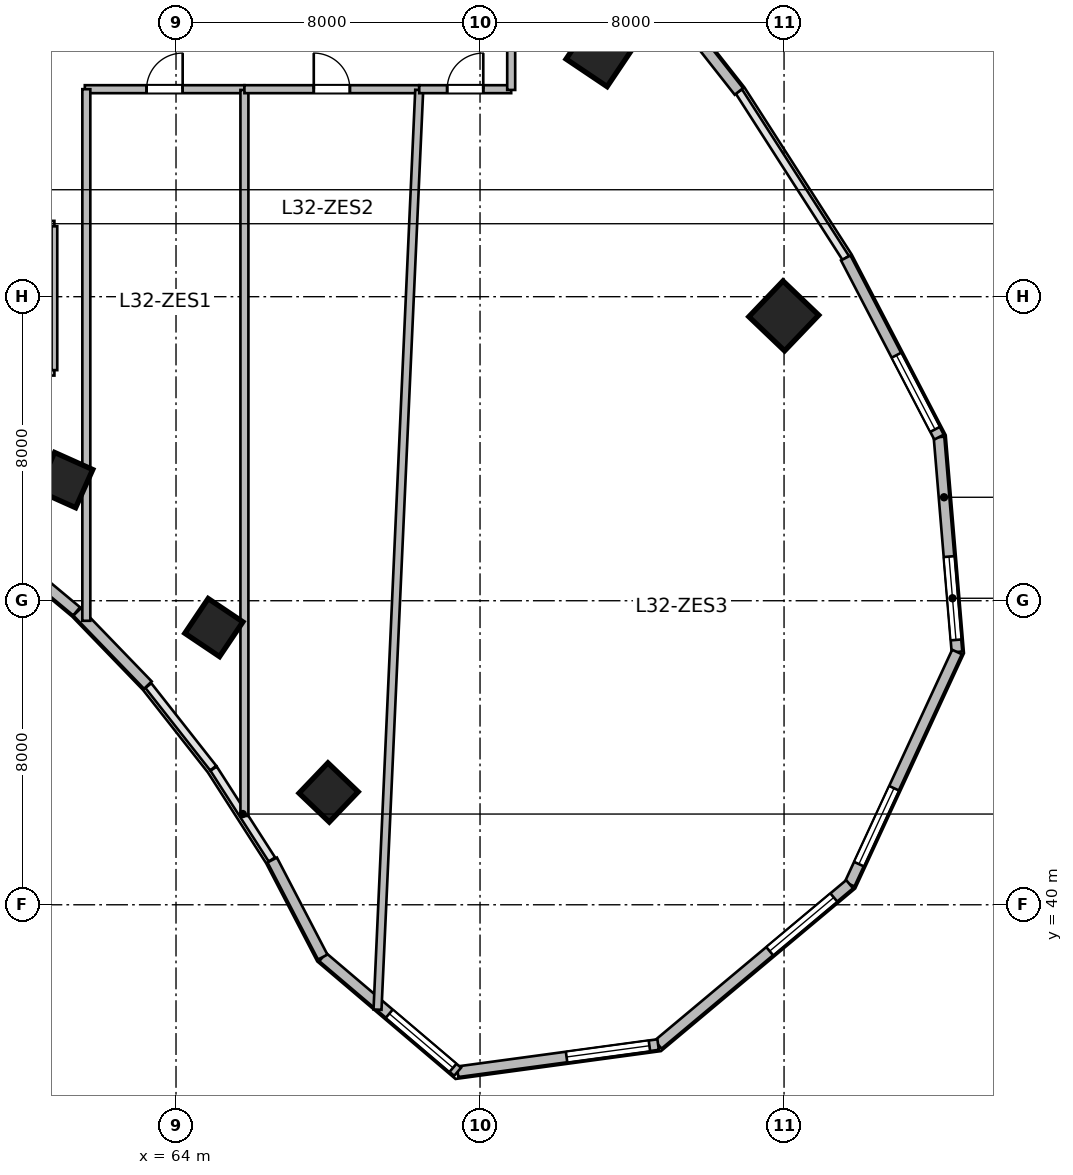
"""IFC4 building model, lengths in metres.
Left out: names, types, materials, properties, quantities, classifications, styles, units other than length and angle.
Written with IfcOpenShell. Run it as: python <this file> out.ifc"""

import sys

from ifc_helpers import new_model, si_unit, direction, frame, frame_2d, origin, origin_2d, place, context, subcontext, project, spatial, rectangle, extrude, source, transform, mapped, element, fill, save


model = new_model("IFC4")
c1 = context("Model", 3, precision=1e-05, world=origin(), true_north=direction((0.0, 1.0)))
c2 = subcontext(c1, "Body", "Model", "MODEL_VIEW")
j1 = project(units=[si_unit("LENGTHUNIT", "METRE"), si_unit("PLANEANGLEUNIT", "RADIAN")], contexts=[c1])
p1 = place(None, origin())
s1 = spatial("IfcSite", under=j1, at=p1, CompositionType="ELEMENT")
p2 = place(p1, origin())
s2 = spatial("IfcBuilding", under=s1, at=p2, CompositionType="ELEMENT")
p3 = place(p2, frame((0.0, 0.0, 135.0)))
s3 = spatial("IfcBuildingStorey", under=s2, at=p3, CompositionType="ELEMENT", Elevation=135.0)
m1 = source(origin(), c2, "Body", "SweptSolid", [
    extrude(rectangle(XDim=1.1, YDim=1.1, at=origin_2d()), origin(), (0.0, 0.0, 1.0), 3.9),
])
for number, where, z_axis, x_axis in (
    (1, (61.082, 51.175, 0.0), (0.0, 0.0, 1.0), (0.409, 0.912, 0.0)),
    (2, (64.996, 47.294, 0.0), (0.0, 0.0, 1.0), (0.558, 0.83, 0.0)),
):
    element("IfcColumn", number, at=place(p3, frame(where, z_axis=z_axis, x_axis=x_axis)), inside=s3, PredefinedType="COLUMN", context=c2, shape_type="MappedRepresentation", body=[
        mapped(m1, transform((0.0, 0.0, 0.0), scale=1.0)),
    ])
m2 = source(origin(), c2, "Body", "SweptSolid", [
    extrude(rectangle(XDim=1.3, YDim=1.3, at=origin_2d()), origin(), (0.0, 0.0, 1.0), 3.9),
])
p4 = place(p3, frame((75.167, 62.43, 0.0), z_axis=(0.0, 0.0, 1.0), x_axis=(0.55774510898, 0.830012285095, 0.0)))
e3 = element("IfcColumn", 3, at=p4, inside=s3, PredefinedType="COLUMN", context=c2, shape_type="MappedRepresentation", body=[
    mapped(m2, transform((0.0, 0.0, 0.0), scale=1.0)),
])
p5 = place(p3, frame((68.015, 42.955, 0.0), z_axis=(0.0, 0.0, 1.0), x_axis=(0.690756218984, 0.723087716626, 0.0)))
e4 = element("IfcColumn", 4, at=p5, inside=s3, PredefinedType="COLUMN", context=c2, shape_type="MappedRepresentation", body=[
    mapped(m1, transform((0.0, 0.0, 0.0), scale=1.0)),
])
p6 = place(p3, frame((79.993, 55.494, 0.0), z_axis=(0.0, 0.0, 1.0), x_axis=(0.690756218984, 0.723087716626, 0.0)))
e5 = element("IfcColumn", 5, at=p6, inside=s3, PredefinedType="COLUMN", context=c2, shape_type="MappedRepresentation", body=[
    mapped(m2, transform((0.0, 0.0, 0.0), scale=1.0)),
])
m3 = source(origin(), c2, "Body", "SweptSolid", [
    extrude(rectangle(XDim=5.674, YDim=0.28, at=frame_2d((2.837, 0.0))), origin(), (0.0, 0.0, 1.0), 3.65),
])
p7 = place(p3, frame((84.078, 52.305, 0.0), z_axis=(0.0, 0.0, 1.0), x_axis=(0.083309007867, -0.996523762491, 0.0)))
e6 = element("IfcWall", 6, at=p7, inside=s3, PredefinedType="SOLIDWALL", context=c2, shape_type="MappedRepresentation", body=[
    mapped(m3, transform((0.0, 0.0, 0.0), scale=1.0)),
])
p8 = place(p7, frame((3.155, 0.0, 0.95)))
e7 = element("IfcOpeningElement", 7, at=p8, cuts=e6, PredefinedType="OPENING", context=c2, shape_type="SweptSolid", body=[
    extrude(rectangle(XDim=2.2, YDim=2.1, at=frame_2d((1.1, 1.05))), frame((0.0, 0.15, 0.0), z_axis=(0.0, -1.0, 0.0), x_axis=(1.0, 0.0, 0.0)), (0.0, 0.0, 1.0), 0.3),
])
m4 = source(origin(), c2, "Body", "SweptSolid", [
    extrude(rectangle(XDim=6.732, YDim=0.28, at=frame_2d((3.366, 0.0))), origin(), (0.0, 0.0, 1.0), 3.65),
])
p9 = place(p3, frame((84.55, 46.652, 0.0), z_axis=(0.0, 0.0, 1.0), x_axis=(-0.419644552709, -0.907688520023, 0.0)))
e8 = element("IfcWall", 8, at=p9, inside=s3, PredefinedType="SOLIDWALL", context=c2, shape_type="MappedRepresentation", body=[
    mapped(m4, transform((0.0, 0.0, 0.0), scale=1.0)),
])
p10 = place(p9, frame((3.949, 0.0, 0.95)))
e9 = element("IfcOpeningElement", 9, at=p10, cuts=e8, PredefinedType="OPENING", context=c2, shape_type="SweptSolid", body=[
    extrude(rectangle(XDim=2.2, YDim=2.1, at=frame_2d((1.1, 1.05))), frame((0.0, 0.15, 0.0), z_axis=(0.0, -1.0, 0.0), x_axis=(1.0, 0.0, 0.0)), (0.0, 0.0, 1.0), 0.3),
])
m5 = source(origin(), c2, "Body", "SweptSolid", [
    extrude(rectangle(XDim=6.573, YDim=0.28, at=frame_2d((3.287, 0.0))), origin(), (0.0, 0.0, 1.0), 3.65),
])
p11 = place(p3, frame((81.725, 40.541, 0.0), z_axis=(0.0, 0.0, 1.0), x_axis=(-0.766715154163, -0.641987439423, 0.0)))
e10 = element("IfcWall", 10, at=p11, inside=s3, PredefinedType="SOLIDWALL", context=c2, shape_type="MappedRepresentation", body=[
    mapped(m5, transform((0.0, 0.0, 0.0), scale=1.0)),
])
p12 = place(p11, frame((0.543, 0.0, 0.95)))
e11 = element("IfcOpeningElement", 11, at=p12, cuts=e10, PredefinedType="OPENING", context=c2, shape_type="SweptSolid", body=[
    extrude(rectangle(XDim=2.2, YDim=2.1, at=frame_2d((1.1, 1.05))), frame((0.0, 0.15, 0.0), z_axis=(0.0, -1.0, 0.0), x_axis=(1.0, 0.0, 0.0)), (0.0, 0.0, 1.0), 0.3),
])
m6 = source(origin(), c2, "Body", "SweptSolid", [
    extrude(rectangle(XDim=5.324, YDim=0.28, at=frame_2d((2.662, 0.0))), origin(), (0.0, 0.0, 1.0), 3.65),
])
p13 = place(p3, frame((76.686, 36.322, 0.0), z_axis=(0.0, 0.0, 1.0), x_axis=(-0.990931467223, -0.134368252451, 0.0)))
e12 = element("IfcWall", 12, at=p13, inside=s3, PredefinedType="SOLIDWALL", context=c2, shape_type="MappedRepresentation", body=[
    mapped(m6, transform((0.0, 0.0, 0.0), scale=1.0)),
])
p14 = place(p13, frame((0.231, 0.0, 0.95)))
e13 = element("IfcOpeningElement", 13, at=p14, cuts=e12, PredefinedType="OPENING", context=c2, shape_type="SweptSolid", body=[
    extrude(rectangle(XDim=2.2, YDim=2.1, at=frame_2d((1.1, 1.05))), frame((0.0, 0.15, 0.0), z_axis=(0.0, -1.0, 0.0), x_axis=(1.0, 0.0, 0.0)), (0.0, 0.0, 1.0), 0.3),
])
m7 = source(origin(), c2, "Body", "SweptSolid", [
    extrude(rectangle(XDim=4.659, YDim=0.28, at=frame_2d((2.33, 0.0))), origin(), (0.0, 0.0, 1.0), 3.65),
])
p15 = place(p3, frame((71.41, 35.606, 0.0), z_axis=(0.0, 0.0, 1.0), x_axis=(-0.761913458795, 0.647678841176, 0.0)))
e14 = element("IfcWall", 14, at=p15, inside=s3, PredefinedType="SOLIDWALL", context=c2, shape_type="MappedRepresentation", body=[
    mapped(m7, transform((0.0, 0.0, 0.0), scale=1.0)),
])
p16 = place(p15, frame((0.16, 0.0, 0.95)))
e15 = element("IfcOpeningElement", 15, at=p16, cuts=e14, PredefinedType="OPENING", context=c2, shape_type="SweptSolid", body=[
    extrude(rectangle(XDim=2.2, YDim=2.1, at=frame_2d((1.1, 1.05))), frame((0.0, 0.15, 0.0), z_axis=(0.0, -1.0, 0.0), x_axis=(1.0, 0.0, 0.0)), (0.0, 0.0, 1.0), 0.3),
])
m8 = source(origin(), c2, "Body", "SweptSolid", [
    extrude(rectangle(XDim=2.88, YDim=0.28, at=frame_2d((1.44, 0.0))), origin(), (0.0, 0.0, 1.0), 3.65),
])
p17 = place(p3, frame((67.861, 38.624, 0.0), z_axis=(0.0, 0.0, 1.0), x_axis=(-0.461769086658, 0.887000175088, 0.0)))
e16 = element("IfcWall", 16, at=p17, inside=s3, PredefinedType="SOLIDWALL", context=c2, shape_type="MappedRepresentation", body=[
    mapped(m8, transform((0.0, 0.0, 0.0), scale=1.0)),
])
m9 = source(origin(), c2, "Body", "SweptSolid", [
    extrude(rectangle(XDim=2.68, YDim=0.28, at=frame_2d((1.34, 0.0))), origin(), (0.0, 0.0, 1.0), 3.65),
])
p18 = place(p3, frame((63.26, 45.78, 0.0), z_axis=(0.0, 0.0, 1.0), x_axis=(-0.694561996568, 0.719432855049, 0.0)))
e17 = element("IfcWall", 17, at=p18, inside=s3, PredefinedType="SOLIDWALL", context=c2, shape_type="MappedRepresentation", body=[
    mapped(m9, transform((0.0, 0.0, 0.0), scale=1.0)),
])
m10 = source(origin(), c2, "Body", "SweptSolid", [
    extrude(rectangle(XDim=2.601, YDim=0.28, at=frame_2d((1.3, 0.0))), origin(), (0.0, 0.0, 1.0), 3.65),
])
p19 = place(p3, frame((61.385, 47.721, 0.0), z_axis=(0.0, 0.0, 1.0), x_axis=(-0.76796730295, 0.640489048775, 0.0)))
e18 = element("IfcWall", 18, at=p19, inside=s3, PredefinedType="SOLIDWALL", context=c2, shape_type="MappedRepresentation", body=[
    mapped(m10, transform((0.0, 0.0, 0.0), scale=1.0)),
])
m11 = source(origin(), c2, "Body", "SweptSolid", [
    extrude(rectangle(XDim=5.058, YDim=0.28, at=frame_2d((2.529, 0.0))), origin(), (0.0, 0.0, 1.0), 3.65),
])
p20 = place(p3, frame((75.685, 65.376, 0.0), z_axis=(0.0, 0.0, 1.0), x_axis=(0.618145507434, -0.786063694391, 0.0)))
e19 = element("IfcWall", 19, at=p20, inside=s3, PredefinedType="SOLIDWALL", context=c2, shape_type="MappedRepresentation", body=[
    mapped(m11, transform((0.0, 0.0, 0.0), scale=1.0)),
])
m12 = source(origin(), c2, "Body", "SweptSolid", [
    extrude(rectangle(XDim=5.315, YDim=0.28, at=frame_2d((2.658, 0.0))), origin(), (0.0, 0.0, 1.0), 3.65),
])
p21 = place(p3, frame((81.623, 57.02, 0.0), z_axis=(0.0, 0.0, 1.0), x_axis=(0.461760527822, -0.887004630735, 0.0)))
e20 = element("IfcWall", 20, at=p21, inside=s3, PredefinedType="SOLIDWALL", context=c2, shape_type="MappedRepresentation", body=[
    mapped(m12, transform((0.0, 0.0, 0.0), scale=1.0)),
])
p22 = place(p21, frame((2.886, 0.0, 0.95)))
e21 = element("IfcOpeningElement", 21, at=p22, cuts=e20, PredefinedType="OPENING", context=c2, shape_type="SweptSolid", body=[
    extrude(rectangle(XDim=2.2, YDim=2.1, at=frame_2d((1.1, 1.05))), frame((0.0, 0.15, 0.0), z_axis=(0.0, -1.0, 0.0), x_axis=(1.0, 0.0, 0.0)), (0.0, 0.0, 1.0), 0.3),
])
m13 = source(origin(), c2, "Body", "SweptSolid", [
    extrude(rectangle(XDim=6.6, YDim=0.15, at=frame_2d((3.3, 0.0))), origin(), (0.0, 0.0, 1.0), 3.095),
])
p23 = place(p3, frame((54.2, 54.0, 0.0), z_axis=(0.0, 0.0, 1.0), x_axis=(1.0, 0.0, 0.0)))
e22 = element("IfcWall", 22, at=p23, inside=s3, PredefinedType="PARTITIONING", context=c2, shape_type="MappedRepresentation", body=[
    mapped(m13, transform((0.0, 0.0, 0.0), scale=1.0)),
])
m14 = source(origin(), c2, "Body", "SweptSolid", [
    extrude(rectangle(XDim=6.6, YDim=0.15, at=frame_2d((3.3, 0.0))), origin(), (0.0, 0.0, 1.0), 3.65),
])
p24 = place(p3, frame((54.2, 57.92, 0.0), z_axis=(0.0, 0.0, 1.0), x_axis=(1.0, 0.0, 0.0)))
e23 = element("IfcWall", 23, at=p24, inside=s3, PredefinedType="PARTITIONING", context=c2, shape_type="MappedRepresentation", body=[
    mapped(m14, transform((0.0, 0.0, 0.0), scale=1.0)),
])
p25 = place(p24, frame((2.825, 0.0, 0.0)))
e24 = element("IfcOpeningElement", 24, at=p25, cuts=e23, PredefinedType="OPENING", context=c2, shape_type="SweptSolid", body=[
    extrude(rectangle(XDim=0.95, YDim=2.1, at=frame_2d((0.475, 1.05))), frame((0.0, 0.085, 0.0), z_axis=(0.0, -1.0, 0.0), x_axis=(1.0, 0.0, 0.0)), (0.0, 0.0, 1.0), 0.17),
])
m15 = source(origin(), c2, "Body", "SweptSolid", [
    extrude(rectangle(XDim=3.785, YDim=0.15, at=frame_2d((1.893, 0.0))), origin(), (0.0, 0.0, 1.0), 3.65),
])
p26 = place(p3, frame((60.8, 54.067, 0.0), z_axis=(0.0, 0.0, 1.0), x_axis=(0.0, 1.0, 0.0)))
e25 = element("IfcWall", 25, at=p26, inside=s3, PredefinedType="PARTITIONING", context=c2, shape_type="MappedRepresentation", body=[
    mapped(m15, transform((0.0, 0.0, 0.0), scale=1.0)),
])
m16 = source(origin(), c2, "Body", "SweptSolid", [
    extrude(rectangle(XDim=4.2, YDim=0.21, at=frame_2d((2.1, 0.0))), origin(), (0.0, 0.0, 1.0), 3.65),
])
p27 = place(p3, frame((61.6, 61.46, 0.0), z_axis=(0.0, 0.0, 1.0), x_axis=(1.0, 0.0, 0.0)))
e26 = element("IfcWall", 26, at=p27, inside=s3, PredefinedType="PARTITIONING", context=c2, shape_type="MappedRepresentation", body=[
    mapped(m16, transform((0.0, 0.0, 0.0), scale=1.0)),
])
p28 = place(p27, frame((1.625, 0.0, 0.0)))
e27 = element("IfcOpeningElement", 27, at=p28, cuts=e26, PredefinedType="OPENING", context=c2, shape_type="SweptSolid", body=[
    extrude(rectangle(XDim=0.95, YDim=2.1, at=frame_2d((0.475, 1.05))), frame((0.0, 0.115, 0.0), z_axis=(0.0, -1.0, 0.0), x_axis=(1.0, 0.0, 0.0)), (0.0, 0.0, 1.0), 0.23),
])
m17 = source(origin(), c2, "Body", "SweptSolid", [
    extrude(rectangle(XDim=19.103, YDim=0.21, at=frame_2d((9.552, 0.0))), origin(), (0.0, 0.0, 1.0), 2.942),
])
p29 = place(p3, frame((65.8, 42.337, 0.0), z_axis=(0.0, 0.0, 1.0), x_axis=(0.0, 1.0, 0.0)))
e28 = element("IfcWall", 28, at=p29, inside=s3, PredefinedType="PARTITIONING", context=c2, shape_type="MappedRepresentation", body=[
    mapped(m17, transform((0.0, 0.0, 0.0), scale=1.0)),
])
m18 = source(origin(), c2, "Body", "SweptSolid", [
    extrude(rectangle(XDim=4.6, YDim=0.21, at=frame_2d((2.3, 0.0))), origin(), (0.0, 0.0, 1.0), 3.65),
])
p30 = place(p3, frame((65.8, 61.46, 0.0), z_axis=(0.0, 0.0, 1.0), x_axis=(1.0, 0.0, 0.0)))
e29 = element("IfcWall", 29, at=p30, inside=s3, PredefinedType="PARTITIONING", context=c2, shape_type="MappedRepresentation", body=[
    mapped(m18, transform((0.0, 0.0, 0.0), scale=1.0)),
])
p31 = place(p30, frame((1.825, 0.0, 0.0)))
e30 = element("IfcOpeningElement", 30, at=p31, cuts=e29, PredefinedType="OPENING", context=c2, shape_type="SweptSolid", body=[
    extrude(rectangle(XDim=0.95, YDim=2.1, at=frame_2d((0.475, 1.05))), frame((0.0, 0.115, 0.0), z_axis=(0.0, -1.0, 0.0), x_axis=(1.0, 0.0, 0.0)), (0.0, 0.0, 1.0), 0.23),
])
m19 = source(origin(), c2, "Body", "SweptSolid", [
    extrude(rectangle(XDim=24.224, YDim=0.21, at=frame_2d((12.112, 0.0))), origin(), (0.0, 0.0, 1.0), 2.942),
])
p32 = place(p3, frame((69.302, 37.241, 0.0), z_axis=(0.0, 0.0, 1.0), x_axis=(0.045312570313, 0.998972857975, 0.0)))
e31 = element("IfcWall", 31, at=p32, inside=s3, PredefinedType="PARTITIONING", context=c2, shape_type="MappedRepresentation", body=[
    mapped(m19, transform((0.0, 0.0, 0.0), scale=1.0)),
])
m20 = source(origin(), c2, "Body", "SweptSolid", [
    extrude(rectangle(XDim=2.42, YDim=0.21, at=frame_2d((1.21, 0.0))), origin(), (0.0, 0.0, 1.0), 3.65),
])
p33 = place(p3, frame((70.4, 61.46, 0.0), z_axis=(0.0, 0.0, 1.0), x_axis=(1.0, 0.0, 0.0)))
e32 = element("IfcWall", 32, at=p33, inside=s3, PredefinedType="PARTITIONING", context=c2, shape_type="MappedRepresentation", body=[
    mapped(m20, transform((0.0, 0.0, 0.0), scale=1.0)),
])
p34 = place(p33, frame((0.735, 0.0, 0.0)))
e33 = element("IfcOpeningElement", 33, at=p34, cuts=e32, PredefinedType="OPENING", context=c2, shape_type="SweptSolid", body=[
    extrude(rectangle(XDim=0.95, YDim=2.1, at=frame_2d((0.475, 1.05))), frame((0.0, 0.115, 0.0), z_axis=(0.0, -1.0, 0.0), x_axis=(1.0, 0.0, 0.0)), (0.0, 0.0, 1.0), 0.23),
])
m21 = source(origin(), c2, "Body", "SweptSolid", [
    extrude(rectangle(XDim=13.988, YDim=0.21, at=frame_2d((6.994, 0.0))), origin(), (0.0, 0.0, 1.0), 2.942),
])
p35 = place(p3, frame((61.64, 47.472, 0.0), z_axis=(0.0, 0.0, 1.0), x_axis=(0.0, 1.0, 0.0)))
e34 = element("IfcWall", 34, at=p35, inside=s3, PredefinedType="PARTITIONING", context=c2, shape_type="MappedRepresentation", body=[
    mapped(m21, transform((0.0, 0.0, 0.0), scale=1.0)),
])
m22 = source(origin(), c2, "Body", "SweptSolid", [
    extrude(rectangle(XDim=2.62, YDim=0.21, at=frame_2d((1.31, 0.0))), origin(), (0.0, 0.0, 1.0), 3.28),
])
p36 = place(p3, frame((72.82, 61.44, 0.0), z_axis=(0.0, 0.0, 1.0), x_axis=(0.0, 1.0, 0.0)))
e35 = element("IfcWall", 35, at=p36, inside=s3, PredefinedType="PARTITIONING", context=c2, shape_type="MappedRepresentation", body=[
    mapped(m22, transform((0.0, 0.0, 0.0), scale=1.0)),
])
m23 = source(origin(), c2, "Body", "SweptSolid", [
    extrude(rectangle(XDim=2.2, YDim=2.1, at=frame_2d((1.1, 1.05))), frame((0.0, 0.03, 0.0), z_axis=(0.0, -1.0, 0.0), x_axis=(1.0, 0.0, 0.0)), (0.0, 0.0, 1.0), 0.06),
])
p37 = place(p8, origin())
e36 = element("IfcWindow", 36, at=p37, inside=s3, PartitioningType="TRIPLE_PANEL_VERTICAL", PredefinedType="WINDOW", context=c2, shape_type="MappedRepresentation", body=[
    mapped(m23, transform((0.0, 0.0, 0.0), scale=1.0)),
])
fill(e7, e36)
p38 = place(p10, origin())
e37 = element("IfcWindow", 37, at=p38, inside=s3, PartitioningType="TRIPLE_PANEL_VERTICAL", PredefinedType="WINDOW", context=c2, shape_type="MappedRepresentation", body=[
    mapped(m23, transform((0.0, 0.0, 0.0), scale=1.0)),
])
fill(e9, e37)
p39 = place(p12, origin())
e38 = element("IfcWindow", 38, at=p39, inside=s3, PartitioningType="TRIPLE_PANEL_VERTICAL", PredefinedType="WINDOW", context=c2, shape_type="MappedRepresentation", body=[
    mapped(m23, transform((0.0, 0.0, 0.0), scale=1.0)),
])
fill(e11, e38)
p40 = place(p14, origin())
e39 = element("IfcWindow", 39, at=p40, inside=s3, PartitioningType="TRIPLE_PANEL_VERTICAL", PredefinedType="WINDOW", context=c2, shape_type="MappedRepresentation", body=[
    mapped(m23, transform((0.0, 0.0, 0.0), scale=1.0)),
])
fill(e13, e39)
p41 = place(p16, origin())
e40 = element("IfcWindow", 40, at=p41, inside=s3, PartitioningType="TRIPLE_PANEL_VERTICAL", PredefinedType="WINDOW", context=c2, shape_type="MappedRepresentation", body=[
    mapped(m23, transform((0.0, 0.0, 0.0), scale=1.0)),
])
fill(e15, e40)
p42 = place(p22, origin())
e41 = element("IfcWindow", 41, at=p42, inside=s3, PartitioningType="TRIPLE_PANEL_VERTICAL", PredefinedType="WINDOW", context=c2, shape_type="MappedRepresentation", body=[
    mapped(m23, transform((0.0, 0.0, 0.0), scale=1.0)),
])
fill(e21, e41)
m24 = source(origin(), c2, "Body", "SweptSolid", [
    extrude(rectangle(XDim=0.95, YDim=2.1, at=frame_2d((0.475, 1.05))), frame((0.0, 0.025, 0.0), z_axis=(0.0, -1.0, 0.0), x_axis=(1.0, 0.0, 0.0)), (0.0, 0.0, 1.0), 0.05),
])
p43 = place(p28, origin())
e42 = element("IfcDoor", 42, at=p43, inside=s3, OperationType="SINGLE_SWING_RIGHT", PredefinedType="DOOR", context=c2, shape_type="MappedRepresentation", body=[
    mapped(m24, transform((0.0, 0.0, 0.0), scale=1.0)),
])
fill(e27, e42)
p44 = place(p31, origin())
e43 = element("IfcDoor", 43, at=p44, inside=s3, OperationType="SINGLE_SWING_LEFT", PredefinedType="DOOR", context=c2, shape_type="MappedRepresentation", body=[
    mapped(m24, transform((0.0, 0.0, 0.0), scale=1.0)),
])
fill(e30, e43)
p45 = place(p34, origin())
e44 = element("IfcDoor", 44, at=p45, inside=s3, OperationType="SINGLE_SWING_RIGHT", PredefinedType="DOOR", context=c2, shape_type="MappedRepresentation", body=[
    mapped(m24, transform((0.0, 0.0, 0.0), scale=1.0)),
])
fill(e33, e44)
save(model, sys.argv[1])
